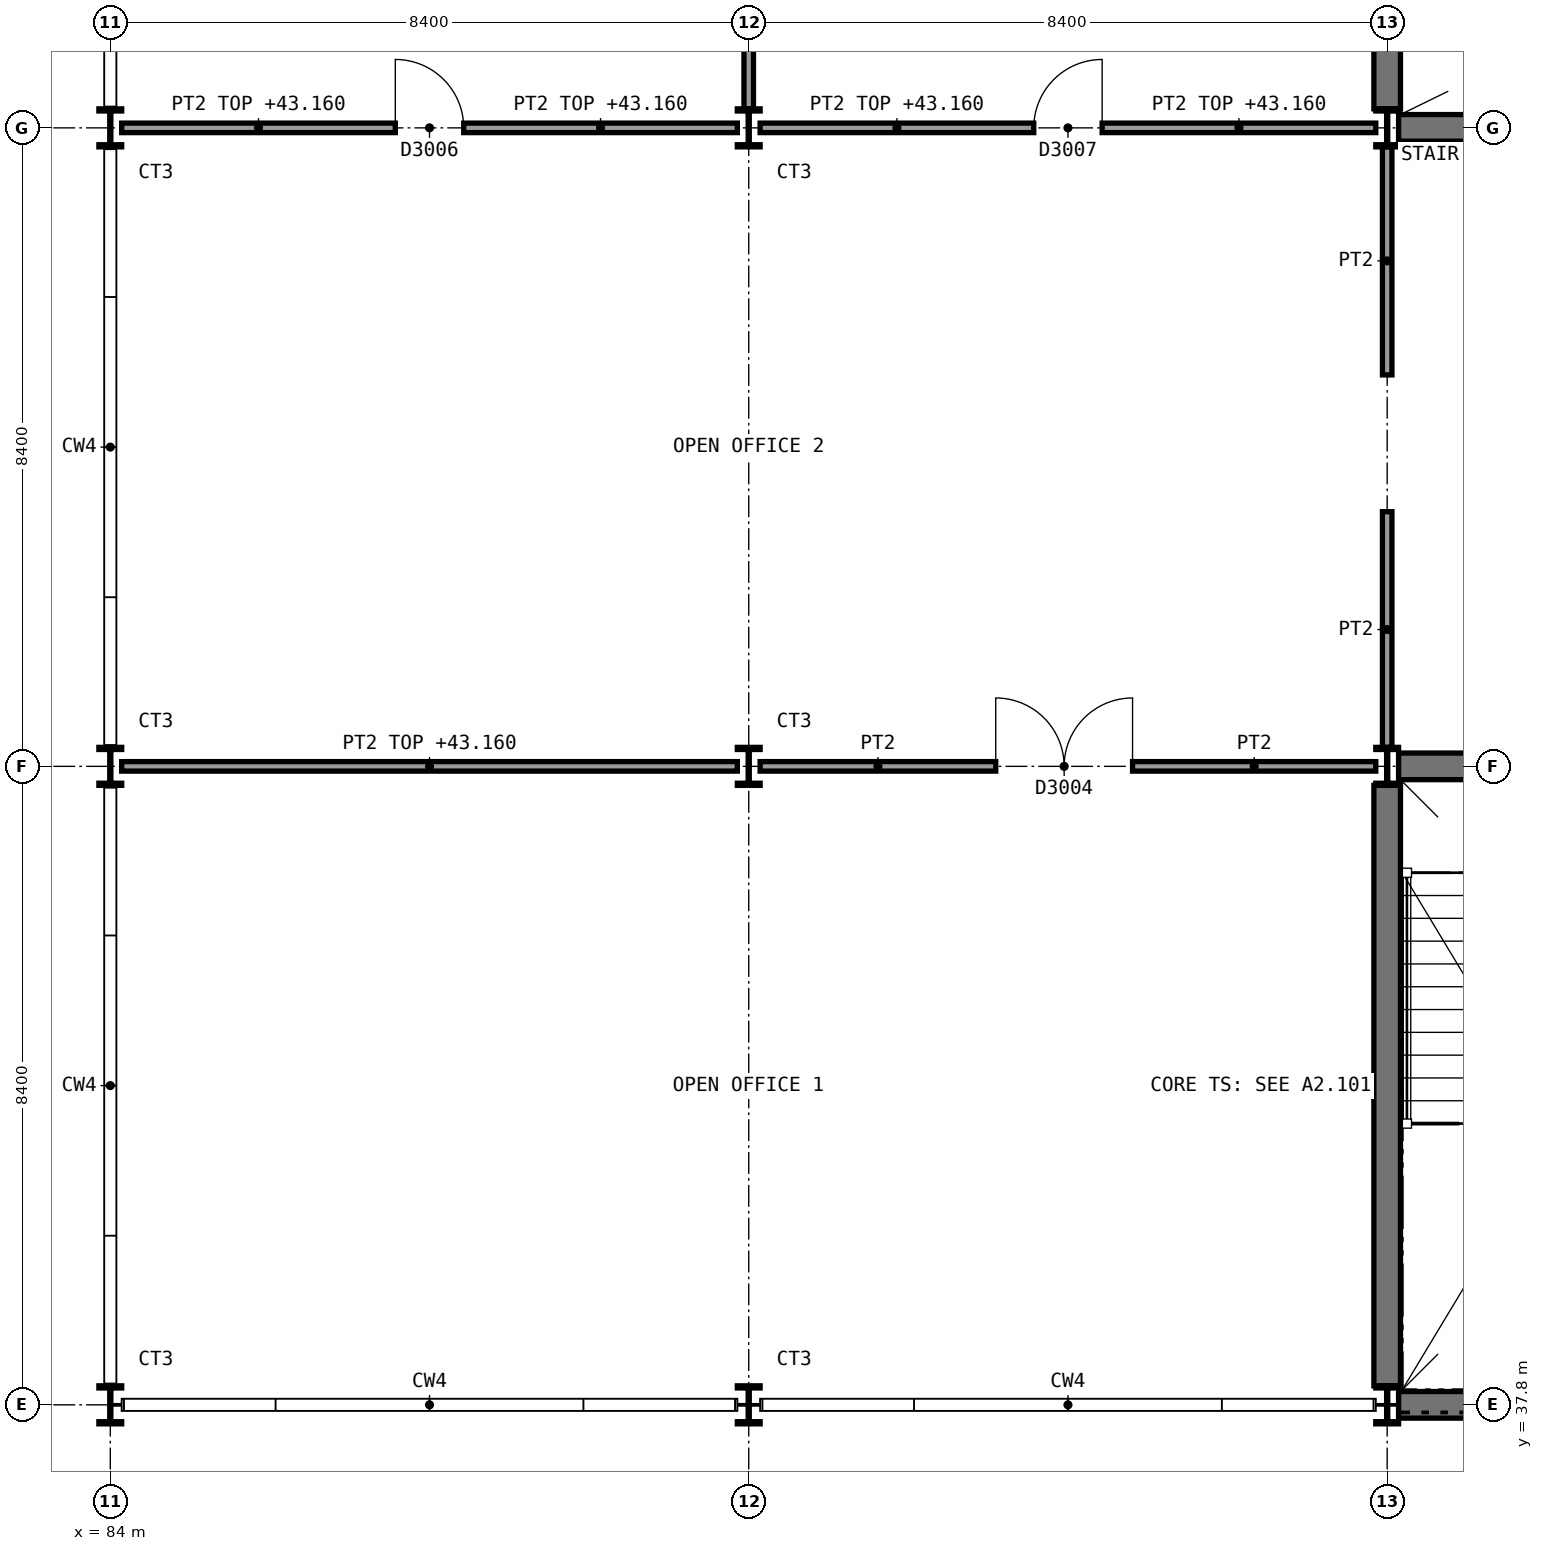
"""IFC4 building model, lengths in metres.
Left out: names, types, materials, properties, quantities, classifications, styles, units other than length and angle.
Written with IfcOpenShell. Run it as: python <this file> out.ifc"""

import sys

from ifc_helpers import new_model, si_unit, direction, frame, frame_2d, origin, origin_2d, place, context, subcontext, project, spatial, rectangle, i_section, extrude, element, fill, save


model = new_model("IFC4")
c1 = context("Model", 3, precision=1e-05, world=origin(), true_north=direction((0.0, 1.0)))
c2 = subcontext(c1, "Body", "Model", "MODEL_VIEW")
j1 = project(units=[si_unit("LENGTHUNIT", "METRE"), si_unit("PLANEANGLEUNIT", "RADIAN")], contexts=[c1])
p1 = place(None, origin())
s1 = spatial("IfcSite", under=j1, at=p1, CompositionType="ELEMENT")
p2 = place(p1, origin())
s2 = spatial("IfcBuilding", under=s1, at=p2, CompositionType="ELEMENT")
p3 = place(p2, frame((0.0, 0.0, 39.6)))
s3 = spatial("IfcBuildingStorey", under=s2, at=p3, CompositionType="ELEMENT", Elevation=39.6)
p4 = place(p3, frame((100.95, 54.6, 0.0), z_axis=(0.0, 0.0, 1.0), x_axis=(1.0, 0.0, 0.0)))
e1 = element("IfcWall", 1, at=p4, inside=s3, PredefinedType="SHEAR", context=c2, shape_type="SweptSolid", body=[
    extrude(rectangle(XDim=16.4, YDim=0.35, at=frame_2d((8.2, 0.0))), origin(), (0.0, 0.0, 1.0), 3.85),
])
p5 = place(p4, frame((1.15, 0.0, 0.0)))
e2 = element("IfcOpeningElement", 2, at=p5, cuts=e1, PredefinedType="OPENING", context=c2, shape_type="SweptSolid", body=[
    extrude(rectangle(XDim=1.8, YDim=2.1, at=frame_2d((0.9, 1.05))), frame((0.0, 0.185, 0.0), z_axis=(0.0, -1.0, 0.0), x_axis=(1.0, 0.0, 0.0)), (0.0, 0.0, 1.0), 0.37),
])
p6 = place(p4, frame((13.55, 0.0, 0.0)))
e3 = element("IfcOpeningElement", 3, at=p6, cuts=e1, PredefinedType="OPENING", context=c2, shape_type="SweptSolid", body=[
    extrude(rectangle(XDim=1.8, YDim=2.1, at=frame_2d((0.9, 1.05))), frame((0.0, 0.185, 0.0), z_axis=(0.0, -1.0, 0.0), x_axis=(1.0, 0.0, 0.0)), (0.0, 0.0, 1.0), 0.37),
])
p7 = place(p4, frame((7.05, 0.0, 0.0)))
e4 = element("IfcOpeningElement", 4, at=p7, cuts=e1, PredefinedType="OPENING", context=c2, shape_type="SweptSolid", body=[
    extrude(rectangle(XDim=2.4, YDim=2.4, at=frame_2d((1.2, 1.2))), frame((0.0, 0.185, 0.0), z_axis=(0.0, -1.0, 0.0), x_axis=(1.0, 0.0, 0.0)), (0.0, 0.0, 1.0), 0.37),
])
p8 = place(p3, frame((100.8, 54.85, 0.0), z_axis=(0.0, 0.0, 1.0), x_axis=(0.0, 1.0, 0.0)))
e5 = element("IfcWall", 5, at=p8, inside=s3, PredefinedType="SHEAR", context=c2, shape_type="SweptSolid", body=[
    extrude(rectangle(XDim=7.9, YDim=0.35, at=frame_2d((3.95, 0.0))), origin(), (0.0, 0.0, 1.0), 3.85),
])
p9 = place(p3, frame((100.95, 37.8, 0.0), z_axis=(0.0, 0.0, 1.0), x_axis=(1.0, 0.0, 0.0)))
e6 = element("IfcWall", 6, at=p9, inside=s3, PredefinedType="SHEAR", context=c2, shape_type="SweptSolid", body=[
    extrude(rectangle(XDim=8.1, YDim=0.35, at=frame_2d((4.05, 0.0))), origin(), (0.0, 0.0, 1.0), 3.85),
])
p10 = place(p3, frame((100.95, 46.2, 0.0), z_axis=(0.0, 0.0, 1.0), x_axis=(1.0, 0.0, 0.0)))
e7 = element("IfcWall", 7, at=p10, inside=s3, PredefinedType="SHEAR", context=c2, shape_type="SweptSolid", body=[
    extrude(rectangle(XDim=8.1, YDim=0.35, at=frame_2d((4.05, 0.0))), origin(), (0.0, 0.0, 1.0), 3.85),
])
p11 = place(p10, frame((1.15, 0.0, 0.0)))
e8 = element("IfcOpeningElement", 8, at=p11, cuts=e7, PredefinedType="OPENING", context=c2, shape_type="SweptSolid", body=[
    extrude(rectangle(XDim=1.8, YDim=2.1, at=frame_2d((0.9, 1.05))), frame((0.0, 0.185, 0.0), z_axis=(0.0, -1.0, 0.0), x_axis=(1.0, 0.0, 0.0)), (0.0, 0.0, 1.0), 0.37),
])
p12 = place(p10, frame((5.6, 0.0, 0.0)))
e9 = element("IfcOpeningElement", 9, at=p12, cuts=e7, PredefinedType="OPENING", context=c2, shape_type="SweptSolid", body=[
    extrude(rectangle(XDim=1.2, YDim=2.1, at=frame_2d((0.6, 1.05))), frame((0.0, 0.185, 0.0), z_axis=(0.0, -1.0, 0.0), x_axis=(1.0, 0.0, 0.0)), (0.0, 0.0, 1.0), 0.37),
])
p13 = place(p3, frame((100.8, 38.05, 0.0), z_axis=(0.0, 0.0, 1.0), x_axis=(0.0, 1.0, 0.0)))
e10 = element("IfcWall", 10, at=p13, inside=s3, PredefinedType="SHEAR", context=c2, shape_type="SweptSolid", body=[
    extrude(rectangle(XDim=7.9, YDim=0.35, at=frame_2d((3.95, 0.0))), origin(), (0.0, 0.0, 1.0), 3.85),
])
for number, where, z_axis, x_axis in (
    (11, (84.0, 37.8, 0.0), (0.0, 0.0, 1.0), (1.0, 0.0, 0.0)),
    (12, (84.0, 46.2, 0.0), (0.0, 0.0, 1.0), (1.0, 0.0, 0.0)),
    (13, (84.0, 54.6, 0.0), (0.0, 0.0, 1.0), (1.0, 0.0, 0.0)),
    (14, (92.4, 37.8, 0.0), (0.0, 0.0, 1.0), (1.0, 0.0, 0.0)),
    (15, (92.4, 46.2, 0.0), (0.0, 0.0, 1.0), (1.0, 0.0, 0.0)),
    (16, (92.4, 54.6, 0.0), (0.0, 0.0, 1.0), (1.0, 0.0, 0.0)),
    (17, (100.8, 37.8, 0.0), (0.0, 0.0, 1.0), (1.0, 0.0, 0.0)),
    (18, (100.8, 46.2, 0.0), (0.0, 0.0, 1.0), (1.0, 0.0, 0.0)),
    (19, (100.8, 54.6, 0.0), (0.0, 0.0, 1.0), (1.0, 0.0, 0.0)),
):
    element("IfcColumn", number, at=place(p3, frame(where, z_axis=z_axis, x_axis=x_axis)), inside=s3, PredefinedType="COLUMN", context=c2, shape_type="SweptSolid", body=[
        extrude(i_section(OverallWidth=0.3, OverallDepth=0.5, WebThickness=0.014, FlangeThickness=0.028, FilletRadius=0.027, at=origin_2d()), origin(), (0.0, 0.0, 1.0), 4.0),
    ])
p14 = place(p3, frame((84.15, 46.2, 0.0), z_axis=(0.0, 0.0, 1.0), x_axis=(1.0, 0.0, 0.0)))
e20 = element("IfcWall", 20, at=p14, inside=s3, PredefinedType="PARTITIONING", context=c2, shape_type="SweptSolid", body=[
    extrude(rectangle(XDim=8.1, YDim=0.125, at=frame_2d((4.05, 0.0))), origin(), (0.0, 0.0, 1.0), 3.56),
])
p15 = place(p3, frame((92.55, 46.2, 0.0), z_axis=(0.0, 0.0, 1.0), x_axis=(1.0, 0.0, 0.0)))
e21 = element("IfcWall", 21, at=p15, inside=s3, PredefinedType="PARTITIONING", context=c2, shape_type="SweptSolid", body=[
    extrude(rectangle(XDim=8.1, YDim=0.125, at=frame_2d((4.05, 0.0))), origin(), (0.0, 0.0, 1.0), 3.5),
])
p16 = place(p15, frame((3.1, 0.0, 0.0)))
e22 = element("IfcOpeningElement", 22, at=p16, cuts=e21, PredefinedType="OPENING", context=c2, shape_type="SweptSolid", body=[
    extrude(rectangle(XDim=1.8, YDim=2.1, at=frame_2d((0.9, 1.05))), frame((0.0, 0.073, 0.0), z_axis=(0.0, -1.0, 0.0), x_axis=(1.0, 0.0, 0.0)), (0.0, 0.0, 1.0), 0.145),
])
p17 = place(p3, frame((100.8, 46.45, 0.0), z_axis=(0.0, 0.0, 1.0), x_axis=(0.0, 1.0, 0.0)))
e23 = element("IfcWall", 23, at=p17, inside=s3, PredefinedType="PARTITIONING", context=c2, shape_type="SweptSolid", body=[
    extrude(rectangle(XDim=3.1, YDim=0.125, at=frame_2d((1.55, 0.0))), origin(), (0.0, 0.0, 1.0), 3.5),
])
p18 = place(p3, frame((100.8, 51.35, 0.0), z_axis=(0.0, 0.0, 1.0), x_axis=(0.0, 1.0, 0.0)))
e24 = element("IfcWall", 24, at=p18, inside=s3, PredefinedType="PARTITIONING", context=c2, shape_type="SweptSolid", body=[
    extrude(rectangle(XDim=3.0, YDim=0.125, at=frame_2d((1.5, 0.0))), origin(), (0.0, 0.0, 1.0), 3.5),
])
p19 = place(p3, frame((84.15, 54.6, 0.0), z_axis=(0.0, 0.0, 1.0), x_axis=(1.0, 0.0, 0.0)))
e25 = element("IfcWall", 25, at=p19, inside=s3, PredefinedType="PARTITIONING", context=c2, shape_type="SweptSolid", body=[
    extrude(rectangle(XDim=8.1, YDim=0.125, at=frame_2d((4.05, 0.0))), origin(), (0.0, 0.0, 1.0), 3.56),
])
p20 = place(p19, frame((3.6, 0.0, 0.0)))
e26 = element("IfcOpeningElement", 26, at=p20, cuts=e25, PredefinedType="OPENING", context=c2, shape_type="SweptSolid", body=[
    extrude(rectangle(XDim=0.9, YDim=2.1, at=frame_2d((0.45, 1.05))), frame((0.0, 0.073, 0.0), z_axis=(0.0, -1.0, 0.0), x_axis=(1.0, 0.0, 0.0)), (0.0, 0.0, 1.0), 0.145),
])
p21 = place(p3, frame((92.55, 54.6, 0.0), z_axis=(0.0, 0.0, 1.0), x_axis=(1.0, 0.0, 0.0)))
e27 = element("IfcWall", 27, at=p21, inside=s3, PredefinedType="PARTITIONING", context=c2, shape_type="SweptSolid", body=[
    extrude(rectangle(XDim=8.1, YDim=0.125, at=frame_2d((4.05, 0.0))), origin(), (0.0, 0.0, 1.0), 3.56),
])
p22 = place(p21, frame((3.6, 0.0, 0.0)))
e28 = element("IfcOpeningElement", 28, at=p22, cuts=e27, PredefinedType="OPENING", context=c2, shape_type="SweptSolid", body=[
    extrude(rectangle(XDim=0.9, YDim=2.1, at=frame_2d((0.45, 1.05))), frame((0.0, 0.073, 0.0), z_axis=(0.0, -1.0, 0.0), x_axis=(1.0, 0.0, 0.0)), (0.0, 0.0, 1.0), 0.145),
])
p23 = place(p3, frame((92.4, 54.85, 0.0), z_axis=(0.0, 0.0, 1.0), x_axis=(0.0, 1.0, 0.0)))
e29 = element("IfcWall", 29, at=p23, inside=s3, PredefinedType="PARTITIONING", context=c2, shape_type="SweptSolid", body=[
    extrude(rectangle(XDim=7.9, YDim=0.125, at=frame_2d((3.95, 0.0))), origin(), (0.0, 0.0, 1.0), 3.5),
])
p24 = place(p16, origin())
e30 = element("IfcDoor", 30, at=p24, inside=s3, OperationType="DOUBLE_DOOR_SINGLE_SWING", PredefinedType="DOOR", context=c2, shape_type="SweptSolid", body=[
    extrude(rectangle(XDim=1.8, YDim=2.1, at=frame_2d((0.9, 1.05))), frame((0.0, 0.025, 0.0), z_axis=(0.0, -1.0, 0.0), x_axis=(1.0, 0.0, 0.0)), (0.0, 0.0, 1.0), 0.05),
])
fill(e22, e30)
p25 = place(p20, origin())
e31 = element("IfcDoor", 31, at=p25, inside=s3, OperationType="SINGLE_SWING_LEFT", PredefinedType="DOOR", context=c2, shape_type="SweptSolid", body=[
    extrude(rectangle(XDim=0.9, YDim=2.1, at=frame_2d((0.45, 1.05))), frame((0.0, 0.025, 0.0), z_axis=(0.0, -1.0, 0.0), x_axis=(1.0, 0.0, 0.0)), (0.0, 0.0, 1.0), 0.05),
])
fill(e26, e31)
p26 = place(p22, origin())
e32 = element("IfcDoor", 32, at=p26, inside=s3, OperationType="SINGLE_SWING_RIGHT", PredefinedType="DOOR", context=c2, shape_type="SweptSolid", body=[
    extrude(rectangle(XDim=0.9, YDim=2.1, at=frame_2d((0.45, 1.05))), frame((0.0, 0.025, 0.0), z_axis=(0.0, -1.0, 0.0), x_axis=(1.0, 0.0, 0.0)), (0.0, 0.0, 1.0), 0.05),
])
fill(e28, e32)
save(model, sys.argv[1])
